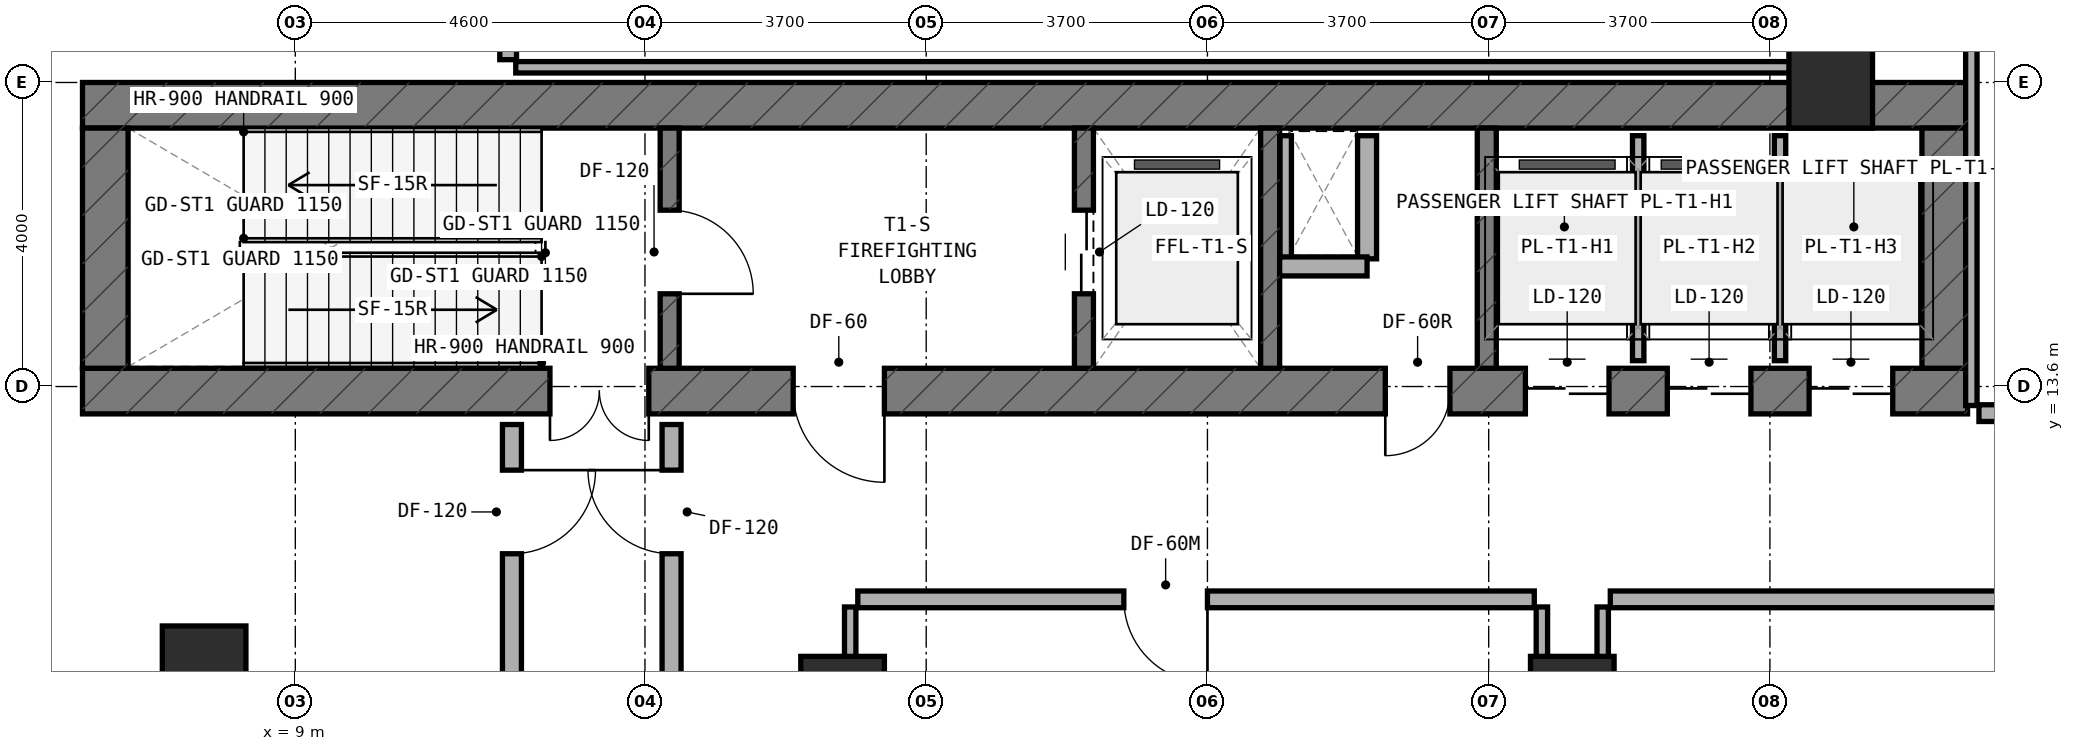
"""IFC4 building model, lengths in metres.
Left out: names, types, materials, properties, quantities, classifications, styles, units other than length and angle.
Written with IfcOpenShell. Run it as: python <this file> out.ifc"""

import sys

from ifc_helpers import new_model, si_unit, direction, frame, frame_2d, origin, origin_2d, place, context, subcontext, project, spatial, rectangle, extrude, element, fill, save


model = new_model("IFC4")
c1 = context("Model", 3, precision=1e-05, world=origin(), true_north=direction((0.0, 1.0)))
c2 = subcontext(c1, "Body", "Model", "MODEL_VIEW")
j1 = project(units=[si_unit("LENGTHUNIT", "METRE"), si_unit("PLANEANGLEUNIT", "RADIAN")], contexts=[c1])
p1 = place(None, origin())
s1 = spatial("IfcSite", under=j1, at=p1, CompositionType="ELEMENT")
p2 = place(p1, origin())
s2 = spatial("IfcBuilding", under=s1, at=p2, CompositionType="ELEMENT")
p3 = place(p2, origin())
s3 = spatial("IfcBuildingStorey", under=s2, at=p3, CompositionType="ELEMENT", Elevation=0.0)
p4 = place(p3, frame((6.2, 13.54, 0.0), z_axis=(0.0, 0.0, 1.0), x_axis=(1.0, 0.0, 0.0)))
e1 = element("IfcWall", 1, at=p4, inside=s3, PredefinedType="SHEAR", context=c2, shape_type="SweptSolid", body=[
    extrude(rectangle(XDim=24.8, YDim=0.6, at=frame_2d((12.4, 0.0))), origin(), (0.0, 0.0, 1.0), 5.4),
])
p5 = place(p4, frame((9.35, 0.0, 0.0)))
e2 = element("IfcOpeningElement", 2, at=p5, cuts=e1, PredefinedType="OPENING", context=c2, shape_type="SweptSolid", body=[
    extrude(rectangle(XDim=1.2, YDim=2.15, at=frame_2d((0.6, 1.075))), frame((0.0, 0.31, 0.0), z_axis=(0.0, -1.0, 0.0), x_axis=(1.0, 0.0, 0.0)), (0.0, 0.0, 1.0), 0.62),
])
p6 = place(p4, frame((6.15, 0.0, 0.0)))
e3 = element("IfcOpeningElement", 3, at=p6, cuts=e1, PredefinedType="OPENING", context=c2, shape_type="SweptSolid", body=[
    extrude(rectangle(XDim=1.3, YDim=2.15, at=frame_2d((0.65, 1.075))), frame((0.0, 0.31, 0.0), z_axis=(0.0, -1.0, 0.0), x_axis=(1.0, 0.0, 0.0)), (0.0, 0.0, 1.0), 0.62),
])
p7 = place(p4, frame((17.14, 0.0, 0.0)))
e4 = element("IfcOpeningElement", 4, at=p7, cuts=e1, PredefinedType="OPENING", context=c2, shape_type="SweptSolid", body=[
    extrude(rectangle(XDim=0.85, YDim=2.1, at=frame_2d((0.425, 1.05))), frame((0.0, 0.31, 0.0), z_axis=(0.0, -1.0, 0.0), x_axis=(1.0, 0.0, 0.0)), (0.0, 0.0, 1.0), 0.62),
])
p8 = place(p4, frame((18.983, 0.0, 0.0)))
e5 = element("IfcOpeningElement", 5, at=p8, cuts=e1, PredefinedType="OPENING", context=c2, shape_type="SweptSolid", body=[
    extrude(rectangle(XDim=1.1, YDim=2.15, at=frame_2d((0.55, 1.075))), frame((0.0, 0.31, 0.0), z_axis=(0.0, -1.0, 0.0), x_axis=(1.0, 0.0, 0.0)), (0.0, 0.0, 1.0), 0.62),
])
p9 = place(p4, frame((20.85, 0.0, 0.0)))
e6 = element("IfcOpeningElement", 6, at=p9, cuts=e1, PredefinedType="OPENING", context=c2, shape_type="SweptSolid", body=[
    extrude(rectangle(XDim=1.1, YDim=2.15, at=frame_2d((0.55, 1.075))), frame((0.0, 0.31, 0.0), z_axis=(0.0, -1.0, 0.0), x_axis=(1.0, 0.0, 0.0)), (0.0, 0.0, 1.0), 0.62),
])
p10 = place(p4, frame((22.716, 0.0, 0.0)))
e7 = element("IfcOpeningElement", 7, at=p10, cuts=e1, PredefinedType="OPENING", context=c2, shape_type="SweptSolid", body=[
    extrude(rectangle(XDim=1.1, YDim=2.15, at=frame_2d((0.55, 1.075))), frame((0.0, 0.31, 0.0), z_axis=(0.0, -1.0, 0.0), x_axis=(1.0, 0.0, 0.0)), (0.0, 0.0, 1.0), 0.62),
])
p11 = place(p3, frame((6.2, 17.3, 0.0), z_axis=(0.0, 0.0, 1.0), x_axis=(1.0, 0.0, 0.0)))
e8 = element("IfcWall", 8, at=p11, inside=s3, PredefinedType="SHEAR", context=c2, shape_type="SweptSolid", body=[
    extrude(rectangle(XDim=24.8, YDim=0.6, at=frame_2d((12.4, 0.0))), origin(), (0.0, 0.0, 1.0), 5.4),
])
for number, where, z_axis, x_axis in (
    (9, (6.5, 13.84, 0.0), (0.0, 0.0, 1.0), (0.0, 1.0, 0.0)),
    (10, (30.7, 13.84, 0.0), (0.0, 0.0, 1.0), (0.0, 1.0, 0.0)),
):
    element("IfcWall", number, at=place(p3, frame(where, z_axis=z_axis, x_axis=x_axis)), inside=s3, PredefinedType="SHEAR", context=c2, shape_type="SweptSolid", body=[
        extrude(rectangle(XDim=3.16, YDim=0.6, at=frame_2d((1.58, 0.0))), origin(), (0.0, 0.0, 1.0), 5.4),
    ])
p12 = place(p3, frame((13.925, 13.84, 0.0), z_axis=(0.0, 0.0, 1.0), x_axis=(0.0, 1.0, 0.0)))
e11 = element("IfcWall", 11, at=p12, inside=s3, PredefinedType="STANDARD", context=c2, shape_type="SweptSolid", body=[
    extrude(rectangle(XDim=3.16, YDim=0.25, at=frame_2d((1.58, 0.0))), origin(), (0.0, 0.0, 1.0), 5.05),
])
p13 = place(p12, frame((0.98, 0.0, 0.0)))
e12 = element("IfcOpeningElement", 12, at=p13, cuts=e11, PredefinedType="OPENING", context=c2, shape_type="SweptSolid", body=[
    extrude(rectangle(XDim=1.1, YDim=2.15, at=frame_2d((0.55, 1.075))), frame((0.0, 0.135, 0.0), z_axis=(0.0, -1.0, 0.0), x_axis=(1.0, 0.0, 0.0)), (0.0, 0.0, 1.0), 0.27),
])
p14 = place(p3, frame((19.375, 13.84, 0.0), z_axis=(0.0, 0.0, 1.0), x_axis=(0.0, 1.0, 0.0)))
e13 = element("IfcWall", 13, at=p14, inside=s3, PredefinedType="STANDARD", context=c2, shape_type="SweptSolid", body=[
    extrude(rectangle(XDim=3.16, YDim=0.25, at=frame_2d((1.58, 0.0))), origin(), (0.0, 0.0, 1.0), 5.05),
])
p15 = place(p14, frame((0.98, 0.0, 0.0)))
e14 = element("IfcOpeningElement", 14, at=p15, cuts=e13, PredefinedType="OPENING", context=c2, shape_type="SweptSolid", body=[
    extrude(rectangle(XDim=1.1, YDim=2.15, at=frame_2d((0.55, 1.075))), frame((0.0, 0.135, 0.0), z_axis=(0.0, -1.0, 0.0), x_axis=(1.0, 0.0, 0.0)), (0.0, 0.0, 1.0), 0.27),
])
for number, where, z_axis, x_axis in (
    (15, (21.825, 13.84, 0.0), (0.0, 0.0, 1.0), (0.0, 1.0, 0.0)),
    (16, (24.675, 13.84, 0.0), (0.0, 0.0, 1.0), (0.0, 1.0, 0.0)),
):
    element("IfcWall", number, at=place(p3, frame(where, z_axis=z_axis, x_axis=x_axis)), inside=s3, PredefinedType="STANDARD", context=c2, shape_type="SweptSolid", body=[
        extrude(rectangle(XDim=3.16, YDim=0.25, at=frame_2d((1.58, 0.0))), origin(), (0.0, 0.0, 1.0), 5.05),
    ])
for number, where, z_axis, x_axis in (
    (17, (16.2, 9.4, 0.0), (0.0, 0.0, 1.0), (1.0, 0.0, 0.0)),
    (18, (25.8, 9.4, 0.0), (0.0, 0.0, 1.0), (1.0, 0.0, 0.0)),
    (19, (7.8, 9.8, 0.0), (0.0, 0.0, 1.0), (1.0, 0.0, 0.0)),
    (20, (29.2, 17.65, 0.0), (0.0, 0.0, 1.0), (1.0, 0.0, 0.0)),
):
    element("IfcColumn", number, at=place(p3, frame(where, z_axis=z_axis, x_axis=x_axis)), inside=s3, PredefinedType="COLUMN", context=c2, shape_type="SweptSolid", body=[
        extrude(rectangle(XDim=1.1, YDim=1.3, at=origin_2d()), origin(), (0.0, 0.0, 1.0), 5.4),
    ])
p16 = place(p3, frame((22.03, 15.28, 0.0), z_axis=(0.0, 0.0, 1.0), x_axis=(0.0, 1.0, 0.0)))
e21 = element("IfcWall", 21, at=p16, inside=s3, PredefinedType="PARTITIONING", context=c2, shape_type="SweptSolid", body=[
    extrude(rectangle(XDim=1.62, YDim=0.15, at=frame_2d((0.81, 0.0))), origin(), (0.0, 0.0, 1.0), 5.05),
])
p17 = place(p3, frame((23.1, 15.28, 0.0), z_axis=(0.0, 0.0, 1.0), x_axis=(0.0, 1.0, 0.0)))
e22 = element("IfcWall", 22, at=p17, inside=s3, PredefinedType="SOLIDWALL", context=c2, shape_type="SweptSolid", body=[
    extrude(rectangle(XDim=1.62, YDim=0.25, at=frame_2d((0.81, 0.0))), origin(), (0.0, 0.0, 1.0), 5.05),
])
p18 = place(p3, frame((21.95, 15.18, 0.0), z_axis=(0.0, 0.0, 1.0), x_axis=(1.0, 0.0, 0.0)))
e23 = element("IfcWall", 23, at=p18, inside=s3, PredefinedType="SOLIDWALL", context=c2, shape_type="SweptSolid", body=[
    extrude(rectangle(XDim=1.15, YDim=0.25, at=frame_2d((0.575, 0.0))), origin(), (0.0, 0.0, 1.0), 5.05),
])
p19 = place(p3, frame((26.667, 13.94, 0.0), z_axis=(0.0, 0.0, 1.0), x_axis=(0.0, 1.0, 0.0)))
e24 = element("IfcWall", 24, at=p19, inside=s3, PredefinedType="PARTITIONING", context=c2, shape_type="SweptSolid", body=[
    extrude(rectangle(XDim=2.96, YDim=0.15, at=frame_2d((1.48, 0.0))), origin(), (0.0, 0.0, 1.0), 5.05),
])
p20 = place(p3, frame((28.533, 13.94, 0.0), z_axis=(0.0, 0.0, 1.0), x_axis=(0.0, 1.0, 0.0)))
e25 = element("IfcWall", 25, at=p20, inside=s3, PredefinedType="PARTITIONING", context=c2, shape_type="SweptSolid", body=[
    extrude(rectangle(XDim=2.96, YDim=0.15, at=frame_2d((1.48, 0.0))), origin(), (0.0, 0.0, 1.0), 4.125),
])
p21 = place(p3, frame((11.85, 0.45, 0.0), z_axis=(0.0, 0.0, 1.0), x_axis=(0.0, 1.0, 0.0)))
e26 = element("IfcWall", 26, at=p21, inside=s3, PredefinedType="SOLIDWALL", context=c2, shape_type="SweptSolid", body=[
    extrude(rectangle(XDim=12.65, YDim=0.25, at=frame_2d((6.325, 0.0))), origin(), (0.0, 0.0, 1.0), 4.225),
])
p22 = place(p21, frame((10.95, 0.0, 0.0)))
e27 = element("IfcOpeningElement", 27, at=p22, cuts=e26, PredefinedType="OPENING", context=c2, shape_type="SweptSolid", body=[
    extrude(rectangle(XDim=1.1, YDim=2.15, at=frame_2d((0.55, 1.075))), frame((0.0, 0.135, 0.0), z_axis=(0.0, -1.0, 0.0), x_axis=(1.0, 0.0, 0.0)), (0.0, 0.0, 1.0), 0.27),
])
p23 = place(p3, frame((13.95, 0.45, 0.0), z_axis=(0.0, 0.0, 1.0), x_axis=(0.0, 1.0, 0.0)))
e28 = element("IfcWall", 28, at=p23, inside=s3, PredefinedType="SOLIDWALL", context=c2, shape_type="SweptSolid", body=[
    extrude(rectangle(XDim=12.65, YDim=0.25, at=frame_2d((6.325, 0.0))), origin(), (0.0, 0.0, 1.0), 4.225),
])
p24 = place(p23, frame((10.95, 0.0, 0.0)))
e29 = element("IfcOpeningElement", 29, at=p24, cuts=e28, PredefinedType="OPENING", context=c2, shape_type="SweptSolid", body=[
    extrude(rectangle(XDim=1.1, YDim=2.15, at=frame_2d((0.55, 1.075))), frame((0.0, 0.135, 0.0), z_axis=(0.0, -1.0, 0.0), x_axis=(1.0, 0.0, 0.0)), (0.0, 0.0, 1.0), 0.27),
])
p25 = place(p3, frame((29.0, 17.9, 0.0), z_axis=(0.0, 0.0, 1.0), x_axis=(0.0, 1.0, 0.0)))
e30 = element("IfcWall", 30, at=p25, inside=s3, PredefinedType="PARTITIONING", context=c2, shape_type="SweptSolid", body=[
    extrude(rectangle(XDim=14.2, YDim=0.15, at=frame_2d((7.1, 0.0))), origin(), (0.0, 0.0, 1.0), 4.025),
])
p26 = place(p3, frame((11.9, 17.8, 0.0), z_axis=(0.0, 0.0, 1.0), x_axis=(1.0, 0.0, 0.0)))
e31 = element("IfcWall", 31, at=p26, inside=s3, PredefinedType="PARTITIONING", context=c2, shape_type="SweptSolid", body=[
    extrude(rectangle(XDim=17.0, YDim=0.15, at=frame_2d((8.5, 0.0))), origin(), (0.0, 0.0, 1.0), 5.05),
])
p27 = place(p3, frame((11.8, 17.9, 0.0), z_axis=(0.0, 0.0, 1.0), x_axis=(0.0, 1.0, 0.0)))
e32 = element("IfcWall", 32, at=p27, inside=s3, PredefinedType="SOLIDWALL", context=c2, shape_type="SweptSolid", body=[
    extrude(rectangle(XDim=14.2, YDim=0.22, at=frame_2d((7.1, 0.0))), origin(), (0.0, 0.0, 1.0), 4.125),
])
p28 = place(p27, frame((5.885, 0.0, 0.0)))
e33 = element("IfcOpeningElement", 33, at=p28, cuts=e32, PredefinedType="OPENING", context=c2, shape_type="SweptSolid", body=[
    extrude(rectangle(XDim=1.1, YDim=2.1, at=frame_2d((0.55, 1.05))), frame((0.0, 0.12, 0.0), z_axis=(0.0, -1.0, 0.0), x_axis=(1.0, 0.0, 0.0)), (0.0, 0.0, 1.0), 0.24),
])
p29 = place(p3, frame((31.05, 13.35, 0.0), z_axis=(0.0, 0.0, 1.0), x_axis=(0.0, 1.0, 0.0)))
e34 = element("IfcWall", 34, at=p29, inside=s3, PredefinedType="PARTITIONING", context=c2, shape_type="SweptSolid", body=[
    extrude(rectangle(XDim=18.75, YDim=0.15, at=frame_2d((9.375, 0.0))), origin(), (0.0, 0.0, 1.0), 4.025),
])
p30 = place(p3, frame((31.15, 13.25, 0.0), z_axis=(0.0, 0.0, 1.0), x_axis=(1.0, 0.0, 0.0)))
e35 = element("IfcWall", 35, at=p30, inside=s3, PredefinedType="SOLIDWALL", context=c2, shape_type="SweptSolid", body=[
    extrude(rectangle(XDim=9.75, YDim=0.22, at=frame_2d((4.875, 0.0))), origin(), (0.0, 0.0, 1.0), 4.575),
])
p31 = place(p30, frame((3.882, 0.0, 0.0)))
e36 = element("IfcOpeningElement", 36, at=p31, cuts=e35, PredefinedType="OPENING", context=c2, shape_type="SweptSolid", body=[
    extrude(rectangle(XDim=1.1, YDim=2.1, at=frame_2d((0.55, 1.05))), frame((0.0, 0.12, 0.0), z_axis=(0.0, -1.0, 0.0), x_axis=(1.0, 0.0, 0.0)), (0.0, 0.0, 1.0), 0.24),
])
for number, where, z_axis, x_axis in (
    (37, (16.3, 0.48, 0.0), (0.0, 0.0, 1.0), (0.0, 1.0, 0.0)),
    (38, (25.4, 0.48, 0.0), (0.0, 0.0, 1.0), (0.0, 1.0, 0.0)),
):
    element("IfcWall", number, at=place(p3, frame(where, z_axis=z_axis, x_axis=x_axis)), inside=s3, PredefinedType="PARTITIONING", context=c2, shape_type="SweptSolid", body=[
        extrude(rectangle(XDim=10.22, YDim=0.15, at=frame_2d((5.11, 0.0))), origin(), (0.0, 0.0, 1.0), 4.425),
    ])
p32 = place(p3, frame((16.4, 10.8, 0.0), z_axis=(0.0, 0.0, 1.0), x_axis=(1.0, 0.0, 0.0)))
e39 = element("IfcWall", 39, at=p32, inside=s3, PredefinedType="SOLIDWALL", context=c2, shape_type="SweptSolid", body=[
    extrude(rectangle(XDim=8.9, YDim=0.22, at=frame_2d((4.45, 0.0))), origin(), (0.0, 0.0, 1.0), 5.05),
])
p33 = place(p32, frame((3.5, 0.0, 0.0)))
e40 = element("IfcOpeningElement", 40, at=p33, cuts=e39, PredefinedType="OPENING", context=c2, shape_type="SweptSolid", body=[
    extrude(rectangle(XDim=1.1, YDim=2.1, at=frame_2d((0.55, 1.05))), frame((0.0, 0.12, 0.0), z_axis=(0.0, -1.0, 0.0), x_axis=(1.0, 0.0, 0.0)), (0.0, 0.0, 1.0), 0.24),
])
p34 = place(p3, frame((26.2, 0.45, 0.0), z_axis=(0.0, 0.0, 1.0), x_axis=(0.0, 1.0, 0.0)))
e41 = element("IfcWall", 41, at=p34, inside=s3, PredefinedType="PARTITIONING", context=c2, shape_type="SweptSolid", body=[
    extrude(rectangle(XDim=10.25, YDim=0.15, at=frame_2d((5.125, 0.0))), origin(), (0.0, 0.0, 1.0), 4.125),
])
p35 = place(p3, frame((26.3, 10.8, 0.0), z_axis=(0.0, 0.0, 1.0), x_axis=(1.0, 0.0, 0.0)))
e42 = element("IfcWall", 42, at=p35, inside=s3, PredefinedType="SOLIDWALL", context=c2, shape_type="SweptSolid", body=[
    extrude(rectangle(XDim=14.8, YDim=0.22, at=frame_2d((7.4, 0.0))), origin(), (0.0, 0.0, 1.0), 4.125),
])
p36 = place(p35, frame((5.875, 0.0, 0.0)))
e43 = element("IfcOpeningElement", 43, at=p36, cuts=e42, PredefinedType="OPENING", context=c2, shape_type="SweptSolid", body=[
    extrude(rectangle(XDim=1.1, YDim=2.1, at=frame_2d((0.55, 1.05))), frame((0.0, 0.12, 0.0), z_axis=(0.0, -1.0, 0.0), x_axis=(1.0, 0.0, 0.0)), (0.0, 0.0, 1.0), 0.24),
])
p37 = place(p13, frame((1.1, 0.0, 0.0), z_axis=(0.0, 0.0, 1.0), x_axis=(-1.0, 0.0, 0.0)))
e44 = element("IfcDoor", 44, at=p37, inside=s3, OperationType="SINGLE_SWING_RIGHT", PredefinedType="DOOR", context=c2, shape_type="SweptSolid", body=[
    extrude(rectangle(XDim=1.1, YDim=2.15, at=frame_2d((0.55, 1.075))), frame((0.0, 0.025, 0.0), z_axis=(0.0, -1.0, 0.0), x_axis=(1.0, 0.0, 0.0)), (0.0, 0.0, 1.0), 0.05),
])
fill(e12, e44)
p38 = place(p5, frame((1.2, 0.0, 0.0), z_axis=(0.0, 0.0, 1.0), x_axis=(-1.0, 0.0, 0.0)))
e45 = element("IfcDoor", 45, at=p38, inside=s3, OperationType="SINGLE_SWING_LEFT", PredefinedType="DOOR", context=c2, shape_type="SweptSolid", body=[
    extrude(rectangle(XDim=1.2, YDim=2.15, at=frame_2d((0.6, 1.075))), frame((0.0, 0.025, 0.0), z_axis=(0.0, -1.0, 0.0), x_axis=(1.0, 0.0, 0.0)), (0.0, 0.0, 1.0), 0.05),
])
fill(e2, e45)
p39 = place(p6, frame((1.3, 0.0, 0.0), z_axis=(0.0, 0.0, 1.0), x_axis=(-1.0, 0.0, 0.0)))
e46 = element("IfcDoor", 46, at=p39, inside=s3, OperationType="DOUBLE_DOOR_SINGLE_SWING", PredefinedType="DOOR", context=c2, shape_type="SweptSolid", body=[
    extrude(rectangle(XDim=1.3, YDim=2.15, at=frame_2d((0.65, 1.075))), frame((0.0, 0.025, 0.0), z_axis=(0.0, -1.0, 0.0), x_axis=(1.0, 0.0, 0.0)), (0.0, 0.0, 1.0), 0.05),
])
fill(e3, e46)
p40 = place(p15, origin())
e47 = element("IfcDoor", 47, at=p40, inside=s3, OperationType="DOUBLE_DOOR_SLIDING", PredefinedType="DOOR", context=c2, shape_type="SweptSolid", body=[
    extrude(rectangle(XDim=1.1, YDim=2.15, at=frame_2d((0.55, 1.075))), frame((0.0, 0.025, 0.0), z_axis=(0.0, -1.0, 0.0), x_axis=(1.0, 0.0, 0.0)), (0.0, 0.0, 1.0), 0.05),
])
fill(e14, e47)
p41 = place(p7, frame((0.85, 0.0, 0.0), z_axis=(0.0, 0.0, 1.0), x_axis=(-1.0, 0.0, 0.0)))
e48 = element("IfcDoor", 48, at=p41, inside=s3, OperationType="SINGLE_SWING_RIGHT", PredefinedType="DOOR", context=c2, shape_type="SweptSolid", body=[
    extrude(rectangle(XDim=0.85, YDim=2.1, at=frame_2d((0.425, 1.05))), frame((0.0, 0.025, 0.0), z_axis=(0.0, -1.0, 0.0), x_axis=(1.0, 0.0, 0.0)), (0.0, 0.0, 1.0), 0.05),
])
fill(e4, e48)
p42 = place(p8, frame((1.1, 0.0, 0.0), z_axis=(0.0, 0.0, 1.0), x_axis=(-1.0, 0.0, 0.0)))
e49 = element("IfcDoor", 49, at=p42, inside=s3, OperationType="DOUBLE_DOOR_SLIDING", PredefinedType="DOOR", context=c2, shape_type="SweptSolid", body=[
    extrude(rectangle(XDim=1.1, YDim=2.15, at=frame_2d((0.55, 1.075))), frame((0.0, 0.025, 0.0), z_axis=(0.0, -1.0, 0.0), x_axis=(1.0, 0.0, 0.0)), (0.0, 0.0, 1.0), 0.05),
])
fill(e5, e49)
p43 = place(p9, frame((1.1, 0.0, 0.0), z_axis=(0.0, 0.0, 1.0), x_axis=(-1.0, 0.0, 0.0)))
e50 = element("IfcDoor", 50, at=p43, inside=s3, OperationType="DOUBLE_DOOR_SLIDING", PredefinedType="DOOR", context=c2, shape_type="SweptSolid", body=[
    extrude(rectangle(XDim=1.1, YDim=2.15, at=frame_2d((0.55, 1.075))), frame((0.0, 0.025, 0.0), z_axis=(0.0, -1.0, 0.0), x_axis=(1.0, 0.0, 0.0)), (0.0, 0.0, 1.0), 0.05),
])
fill(e6, e50)
p44 = place(p10, frame((1.1, 0.0, 0.0), z_axis=(0.0, 0.0, 1.0), x_axis=(-1.0, 0.0, 0.0)))
e51 = element("IfcDoor", 51, at=p44, inside=s3, OperationType="DOUBLE_DOOR_SLIDING", PredefinedType="DOOR", context=c2, shape_type="SweptSolid", body=[
    extrude(rectangle(XDim=1.1, YDim=2.15, at=frame_2d((0.55, 1.075))), frame((0.0, 0.025, 0.0), z_axis=(0.0, -1.0, 0.0), x_axis=(1.0, 0.0, 0.0)), (0.0, 0.0, 1.0), 0.05),
])
fill(e7, e51)
p45 = place(p22, frame((1.1, 0.0, 0.0), z_axis=(0.0, 0.0, 1.0), x_axis=(-1.0, 0.0, 0.0)))
e52 = element("IfcDoor", 52, at=p45, inside=s3, OperationType="SINGLE_SWING_LEFT", PredefinedType="DOOR", context=c2, shape_type="SweptSolid", body=[
    extrude(rectangle(XDim=1.1, YDim=2.15, at=frame_2d((0.55, 1.075))), frame((0.0, 0.025, 0.0), z_axis=(0.0, -1.0, 0.0), x_axis=(1.0, 0.0, 0.0)), (0.0, 0.0, 1.0), 0.05),
])
fill(e27, e52)
p46 = place(p24, origin())
e53 = element("IfcDoor", 53, at=p46, inside=s3, OperationType="SINGLE_SWING_RIGHT", PredefinedType="DOOR", context=c2, shape_type="SweptSolid", body=[
    extrude(rectangle(XDim=1.1, YDim=2.15, at=frame_2d((0.55, 1.075))), frame((0.0, 0.025, 0.0), z_axis=(0.0, -1.0, 0.0), x_axis=(1.0, 0.0, 0.0)), (0.0, 0.0, 1.0), 0.05),
])
fill(e29, e53)
p47 = place(p33, frame((1.1, 0.0, 0.0), z_axis=(0.0, 0.0, 1.0), x_axis=(-1.0, 0.0, 0.0)))
e54 = element("IfcDoor", 54, at=p47, inside=s3, OperationType="SINGLE_SWING_LEFT", PredefinedType="DOOR", context=c2, shape_type="SweptSolid", body=[
    extrude(rectangle(XDim=1.1, YDim=2.1, at=frame_2d((0.55, 1.05))), frame((0.0, 0.025, 0.0), z_axis=(0.0, -1.0, 0.0), x_axis=(1.0, 0.0, 0.0)), (0.0, 0.0, 1.0), 0.05),
])
fill(e40, e54)
save(model, sys.argv[1])
